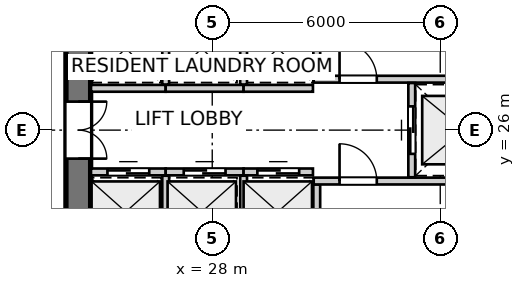
"""IFC4 building model, lengths in metres.
Left out: names, types, materials, properties, quantities, classifications, styles, units other than length and angle.
Written with IfcOpenShell. Run it as: python <this file> out.ifc"""

import sys

from ifc_helpers import new_model, si_unit, direction, frame, frame_2d, origin, place, context, subcontext, project, spatial, rectangle, extrude, source, transform, mapped, element, fill, save


model = new_model("IFC4")
c1 = context("Model", 3, precision=1e-05, world=origin(), true_north=direction((0.0, 1.0)))
c2 = subcontext(c1, "Body", "Model", "MODEL_VIEW")
j1 = project(units=[si_unit("LENGTHUNIT", "METRE"), si_unit("PLANEANGLEUNIT", "RADIAN")], contexts=[c1])
p1 = place(None, origin())
s1 = spatial("IfcSite", under=j1, at=p1, CompositionType="ELEMENT")
p2 = place(p1, origin())
s2 = spatial("IfcBuilding", under=s1, at=p2, CompositionType="ELEMENT")
p3 = place(p2, frame((0.0, 0.0, 118.4)))
s3 = spatial("IfcBuildingStorey", under=s2, at=p3, CompositionType="ELEMENT", Elevation=118.4)
p4 = place(p3, frame((24.475, 33.8, 0.0), z_axis=(0.0, 0.0, 1.0), x_axis=(0.0, -1.0, 0.0)))
e1 = element("IfcWall", 1, at=p4, inside=s3, PredefinedType="SHEAR", context=c2, shape_type="SweptSolid", body=[
    extrude(rectangle(XDim=15.6, YDim=0.65, at=frame_2d((7.8, 0.0))), origin(), (0.0, 0.0, 1.0), 2.95),
])
p5 = place(p4, frame((7.05, 0.0, 0.0)))
e2 = element("IfcOpeningElement", 2, at=p5, cuts=e1, PredefinedType="OPENING", context=c2, shape_type="SweptSolid", body=[
    extrude(rectangle(XDim=1.5, YDim=2.15, at=frame_2d((0.75, 1.075))), frame((0.0, 0.335, 0.0), z_axis=(0.0, -1.0, 0.0), x_axis=(1.0, 0.0, 0.0)), (0.0, 0.0, 1.0), 0.67),
])
p6 = place(p4, frame((3.52, 0.0, 0.0)))
e3 = element("IfcOpeningElement", 3, at=p6, cuts=e1, PredefinedType="OPENING", context=c2, shape_type="SweptSolid", body=[
    extrude(rectangle(XDim=0.86, YDim=2.05, at=frame_2d((0.43, 1.025))), frame((0.0, 0.335, 0.0), z_axis=(0.0, -1.0, 0.0), x_axis=(1.0, 0.0, 0.0)), (0.0, 0.0, 1.0), 0.67),
])
p7 = place(p4, frame((11.22, 0.0, 0.0)))
e4 = element("IfcOpeningElement", 4, at=p7, cuts=e1, PredefinedType="OPENING", context=c2, shape_type="SweptSolid", body=[
    extrude(rectangle(XDim=0.86, YDim=2.05, at=frame_2d((0.43, 1.025))), frame((0.0, 0.335, 0.0), z_axis=(0.0, -1.0, 0.0), x_axis=(1.0, 0.0, 0.0)), (0.0, 0.0, 1.0), 0.67),
])
p8 = place(p3, frame((30.75, 21.46, 0.0), z_axis=(0.0, 0.0, 1.0), x_axis=(0.0, 1.0, 0.0)))
e5 = element("IfcWall", 5, at=p8, inside=s3, PredefinedType="PARTITIONING", context=c2, shape_type="SweptSolid", body=[
    extrude(rectangle(XDim=3.11, YDim=0.18, at=frame_2d((1.555, 0.0))), origin(), (0.0, 0.0, 1.0), 2.95),
])
p9 = place(p8, frame((0.26, 0.0, 0.0)))
e6 = element("IfcOpeningElement", 6, at=p9, cuts=e5, PredefinedType="OPENING", context=c2, shape_type="SweptSolid", body=[
    extrude(rectangle(XDim=0.86, YDim=2.05, at=frame_2d((0.43, 1.025))), frame((0.0, 0.1, 0.0), z_axis=(0.0, -1.0, 0.0), x_axis=(1.0, 0.0, 0.0)), (0.0, 0.0, 1.0), 0.2),
])
p10 = place(p3, frame((30.67, 24.66, 0.0), z_axis=(0.0, 0.0, 1.0), x_axis=(1.0, 0.0, 0.0)))
e7 = element("IfcWall", 7, at=p10, inside=s3, PredefinedType="PARTITIONING", context=c2, shape_type="SweptSolid", body=[
    extrude(rectangle(XDim=5.22, YDim=0.18, at=frame_2d((2.61, 0.0))), origin(), (0.0, 0.0, 1.0), 2.95),
])
p11 = place(p10, frame((0.68, 0.0, 0.0)))
e8 = element("IfcOpeningElement", 8, at=p11, cuts=e7, PredefinedType="OPENING", context=c2, shape_type="SweptSolid", body=[
    extrude(rectangle(XDim=0.98, YDim=2.15, at=frame_2d((0.49, 1.075))), frame((0.0, 0.1, 0.0), z_axis=(0.0, -1.0, 0.0), x_axis=(1.0, 0.0, 0.0)), (0.0, 0.0, 1.0), 0.2),
])
p12 = place(p3, frame((30.75, 27.43, 0.0), z_axis=(0.0, 0.0, 1.0), x_axis=(0.0, 1.0, 0.0)))
e9 = element("IfcWall", 9, at=p12, inside=s3, PredefinedType="PARTITIONING", context=c2, shape_type="SweptSolid", body=[
    extrude(rectangle(XDim=3.11, YDim=0.18, at=frame_2d((1.555, 0.0))), origin(), (0.0, 0.0, 1.0), 2.95),
])
p13 = place(p12, frame((1.98, 0.0, 0.0)))
e10 = element("IfcOpeningElement", 10, at=p13, cuts=e9, PredefinedType="OPENING", context=c2, shape_type="SweptSolid", body=[
    extrude(rectangle(XDim=0.86, YDim=2.05, at=frame_2d((0.43, 1.025))), frame((0.0, 0.1, 0.0), z_axis=(0.0, -1.0, 0.0), x_axis=(1.0, 0.0, 0.0)), (0.0, 0.0, 1.0), 0.2),
])
p14 = place(p3, frame((30.67, 27.34, 0.0), z_axis=(0.0, 0.0, 1.0), x_axis=(1.0, 0.0, 0.0)))
e11 = element("IfcWall", 11, at=p14, inside=s3, PredefinedType="PARTITIONING", context=c2, shape_type="SweptSolid", body=[
    extrude(rectangle(XDim=5.22, YDim=0.18, at=frame_2d((2.61, 0.0))), origin(), (0.0, 0.0, 1.0), 2.95),
])
p15 = place(p14, frame((0.68, 0.0, 0.0)))
e12 = element("IfcOpeningElement", 12, at=p15, cuts=e11, PredefinedType="OPENING", context=c2, shape_type="SweptSolid", body=[
    extrude(rectangle(XDim=0.98, YDim=2.15, at=frame_2d((0.49, 1.075))), frame((0.0, 0.1, 0.0), z_axis=(0.0, -1.0, 0.0), x_axis=(1.0, 0.0, 0.0)), (0.0, 0.0, 1.0), 0.2),
])
p16 = place(p3, frame((33.25, 24.76, 0.0), z_axis=(0.0, 0.0, 1.0), x_axis=(0.0, 1.0, 0.0)))
e13 = element("IfcWall", 13, at=p16, inside=s3, PredefinedType="PARTITIONING", context=c2, shape_type="SweptSolid", body=[
    extrude(rectangle(XDim=2.48, YDim=0.18, at=frame_2d((1.24, 0.0))), origin(), (0.0, 0.0, 1.0), 2.95),
])
p17 = place(p16, frame((0.615, 0.0, 0.0)))
e14 = element("IfcOpeningElement", 14, at=p17, cuts=e13, PredefinedType="OPENING", context=c2, shape_type="SweptSolid", body=[
    extrude(rectangle(XDim=1.25, YDim=2.15, at=frame_2d((0.625, 1.075))), frame((0.0, 0.1, 0.0), z_axis=(0.0, -1.0, 0.0), x_axis=(1.0, 0.0, 0.0)), (0.0, 0.0, 1.0), 0.2),
])
p18 = place(p3, frame((24.81, 24.9, 0.0), z_axis=(0.0, 0.0, 1.0), x_axis=(1.0, 0.0, 0.0)))
e15 = element("IfcWall", 15, at=p18, inside=s3, PredefinedType="PARTITIONING", context=c2, shape_type="SweptSolid", body=[
    extrude(rectangle(XDim=1.965, YDim=0.18, at=frame_2d((0.982, 0.0))), origin(), (0.0, 0.0, 1.0), 2.95),
])
p19 = place(p18, frame((0.433, 0.0, 0.0)))
e16 = element("IfcOpeningElement", 16, at=p19, cuts=e15, PredefinedType="OPENING", context=c2, shape_type="SweptSolid", body=[
    extrude(rectangle(XDim=1.1, YDim=2.15, at=frame_2d((0.55, 1.075))), frame((0.0, 0.1, 0.0), z_axis=(0.0, -1.0, 0.0), x_axis=(1.0, 0.0, 0.0)), (0.0, 0.0, 1.0), 0.2),
])
p20 = place(p3, frame((26.775, 24.9, 0.0), z_axis=(0.0, 0.0, 1.0), x_axis=(1.0, 0.0, 0.0)))
e17 = element("IfcWall", 17, at=p20, inside=s3, PredefinedType="PARTITIONING", context=c2, shape_type="SweptSolid", body=[
    extrude(rectangle(XDim=2.05, YDim=0.18, at=frame_2d((1.025, 0.0))), origin(), (0.0, 0.0, 1.0), 2.95),
])
p21 = place(p20, frame((0.475, 0.0, 0.0)))
e18 = element("IfcOpeningElement", 18, at=p21, cuts=e17, PredefinedType="OPENING", context=c2, shape_type="SweptSolid", body=[
    extrude(rectangle(XDim=1.1, YDim=2.15, at=frame_2d((0.55, 1.075))), frame((0.0, 0.1, 0.0), z_axis=(0.0, -1.0, 0.0), x_axis=(1.0, 0.0, 0.0)), (0.0, 0.0, 1.0), 0.2),
])
p22 = place(p3, frame((26.775, 23.02, 0.0), z_axis=(0.0, 0.0, 1.0), x_axis=(0.0, 1.0, 0.0)))
e19 = element("IfcWall", 19, at=p22, inside=s3, PredefinedType="PARTITIONING", context=c2, shape_type="SweptSolid", body=[
    extrude(rectangle(XDim=1.78, YDim=0.18, at=frame_2d((0.89, 0.0))), origin(), (0.0, 0.0, 1.0), 2.95),
])
p23 = place(p3, frame((28.825, 24.9, 0.0), z_axis=(0.0, 0.0, 1.0), x_axis=(1.0, 0.0, 0.0)))
e20 = element("IfcWall", 20, at=p23, inside=s3, PredefinedType="PARTITIONING", context=c2, shape_type="SweptSolid", body=[
    extrude(rectangle(XDim=1.825, YDim=0.18, at=frame_2d((0.913, 0.0))), origin(), (0.0, 0.0, 1.0), 2.95),
])
p24 = place(p23, frame((0.363, 0.0, 0.0)))
e21 = element("IfcOpeningElement", 21, at=p24, cuts=e20, PredefinedType="OPENING", context=c2, shape_type="SweptSolid", body=[
    extrude(rectangle(XDim=1.1, YDim=2.15, at=frame_2d((0.55, 1.075))), frame((0.0, 0.1, 0.0), z_axis=(0.0, -1.0, 0.0), x_axis=(1.0, 0.0, 0.0)), (0.0, 0.0, 1.0), 0.2),
])
p25 = place(p3, frame((28.825, 23.02, 0.0), z_axis=(0.0, 0.0, 1.0), x_axis=(0.0, 1.0, 0.0)))
e22 = element("IfcWall", 22, at=p25, inside=s3, PredefinedType="PARTITIONING", context=c2, shape_type="SweptSolid", body=[
    extrude(rectangle(XDim=1.78, YDim=0.18, at=frame_2d((0.89, 0.0))), origin(), (0.0, 0.0, 1.0), 2.95),
])
p26 = place(p3, frame((24.81, 27.1, 0.0), z_axis=(0.0, 0.0, 1.0), x_axis=(1.0, 0.0, 0.0)))
e23 = element("IfcWall", 23, at=p26, inside=s3, PredefinedType="PARTITIONING", context=c2, shape_type="SweptSolid", body=[
    extrude(rectangle(XDim=1.965, YDim=0.18, at=frame_2d((0.982, 0.0))), origin(), (0.0, 0.0, 1.0), 2.95),
])
p27 = place(p3, frame((26.775, 27.1, 0.0), z_axis=(0.0, 0.0, 1.0), x_axis=(1.0, 0.0, 0.0)))
e24 = element("IfcWall", 24, at=p27, inside=s3, PredefinedType="PARTITIONING", context=c2, shape_type="SweptSolid", body=[
    extrude(rectangle(XDim=2.05, YDim=0.18, at=frame_2d((1.025, 0.0))), origin(), (0.0, 0.0, 1.0), 2.95),
])
p28 = place(p3, frame((26.775, 27.2, 0.0), z_axis=(0.0, 0.0, 1.0), x_axis=(0.0, 1.0, 0.0)))
e25 = element("IfcWall", 25, at=p28, inside=s3, PredefinedType="PARTITIONING", context=c2, shape_type="SweptSolid", body=[
    extrude(rectangle(XDim=1.78, YDim=0.18, at=frame_2d((0.89, 0.0))), origin(), (0.0, 0.0, 1.0), 2.95),
])
p29 = place(p3, frame((28.825, 27.1, 0.0), z_axis=(0.0, 0.0, 1.0), x_axis=(1.0, 0.0, 0.0)))
e26 = element("IfcWall", 26, at=p29, inside=s3, PredefinedType="PARTITIONING", context=c2, shape_type="SweptSolid", body=[
    extrude(rectangle(XDim=1.825, YDim=0.18, at=frame_2d((0.913, 0.0))), origin(), (0.0, 0.0, 1.0), 2.95),
])
p30 = place(p3, frame((28.825, 27.2, 0.0), z_axis=(0.0, 0.0, 1.0), x_axis=(0.0, 1.0, 0.0)))
e27 = element("IfcWall", 27, at=p30, inside=s3, PredefinedType="PARTITIONING", context=c2, shape_type="SweptSolid", body=[
    extrude(rectangle(XDim=1.78, YDim=0.18, at=frame_2d((0.89, 0.0))), origin(), (0.0, 0.0, 1.0), 2.95),
])
m1 = source(origin(), c2, "Body", "SweptSolid", [
    extrude(rectangle(XDim=1.5, YDim=2.15, at=frame_2d((0.75, 1.075))), frame((0.0, 0.025, 0.0), z_axis=(0.0, -1.0, 0.0), x_axis=(1.0, 0.0, 0.0)), (0.0, 0.0, 1.0), 0.05),
])
p31 = place(p5, origin())
e28 = element("IfcDoor", 28, at=p31, inside=s3, OperationType="DOUBLE_DOOR_SINGLE_SWING", PredefinedType="DOOR", context=c2, shape_type="MappedRepresentation", body=[
    mapped(m1, transform((0.0, 0.0, 0.0), x_axis=(1.0, 0.0, 0.0), y_axis=(0.0, 1.0, 0.0), z_axis=(0.0, 0.0, 1.0), scale=1.0)),
])
fill(e2, e28)
m2 = source(origin(), c2, "Body", "SweptSolid", [
    extrude(rectangle(XDim=0.98, YDim=2.15, at=frame_2d((0.49, 1.075))), frame((0.0, 0.025, 0.0), z_axis=(0.0, -1.0, 0.0), x_axis=(1.0, 0.0, 0.0)), (0.0, 0.0, 1.0), 0.05),
])
p32 = place(p11, origin())
e29 = element("IfcDoor", 29, at=p32, inside=s3, OperationType="SINGLE_SWING_LEFT", PredefinedType="DOOR", context=c2, shape_type="MappedRepresentation", body=[
    mapped(m2, transform((0.0, 0.0, 0.0), x_axis=(1.0, 0.0, 0.0), y_axis=(0.0, 1.0, 0.0), z_axis=(0.0, 0.0, 1.0), scale=1.0)),
])
fill(e8, e29)
p33 = place(p15, origin())
e30 = element("IfcDoor", 30, at=p33, inside=s3, OperationType="SINGLE_SWING_LEFT", PredefinedType="DOOR", context=c2, shape_type="MappedRepresentation", body=[
    mapped(m2, transform((0.0, 0.0, 0.0), x_axis=(1.0, 0.0, 0.0), y_axis=(0.0, 1.0, 0.0), z_axis=(0.0, 0.0, 1.0), scale=1.0)),
])
fill(e12, e30)
m3 = source(origin(), c2, "Body", "SweptSolid", [
    extrude(rectangle(XDim=1.25, YDim=2.15, at=frame_2d((0.625, 1.075))), frame((0.0, 0.025, 0.0), z_axis=(0.0, -1.0, 0.0), x_axis=(1.0, 0.0, 0.0)), (0.0, 0.0, 1.0), 0.05),
])
p34 = place(p17, origin())
e31 = element("IfcDoor", 31, at=p34, inside=s3, OperationType="DOUBLE_DOOR_SLIDING", PredefinedType="DOOR", context=c2, shape_type="MappedRepresentation", body=[
    mapped(m3, transform((0.0, 0.0, 0.0), x_axis=(1.0, 0.0, 0.0), y_axis=(0.0, 1.0, 0.0), z_axis=(0.0, 0.0, 1.0), scale=1.0)),
])
fill(e14, e31)
m4 = source(origin(), c2, "Body", "SweptSolid", [
    extrude(rectangle(XDim=1.1, YDim=2.15, at=frame_2d((0.55, 1.075))), frame((0.0, 0.025, 0.0), z_axis=(0.0, -1.0, 0.0), x_axis=(1.0, 0.0, 0.0)), (0.0, 0.0, 1.0), 0.05),
])
p35 = place(p19, origin())
e32 = element("IfcDoor", 32, at=p35, inside=s3, OperationType="DOUBLE_DOOR_SLIDING", PredefinedType="DOOR", context=c2, shape_type="MappedRepresentation", body=[
    mapped(m4, transform((0.0, 0.0, 0.0), x_axis=(1.0, 0.0, 0.0), y_axis=(0.0, 1.0, 0.0), z_axis=(0.0, 0.0, 1.0), scale=1.0)),
])
fill(e16, e32)
p36 = place(p21, origin())
e33 = element("IfcDoor", 33, at=p36, inside=s3, OperationType="DOUBLE_DOOR_SLIDING", PredefinedType="DOOR", context=c2, shape_type="MappedRepresentation", body=[
    mapped(m4, transform((0.0, 0.0, 0.0), x_axis=(1.0, 0.0, 0.0), y_axis=(0.0, 1.0, 0.0), z_axis=(0.0, 0.0, 1.0), scale=1.0)),
])
fill(e18, e33)
p37 = place(p24, origin())
e34 = element("IfcDoor", 34, at=p37, inside=s3, OperationType="DOUBLE_DOOR_SLIDING", PredefinedType="DOOR", context=c2, shape_type="MappedRepresentation", body=[
    mapped(m4, transform((0.0, 0.0, 0.0), x_axis=(1.0, 0.0, 0.0), y_axis=(0.0, 1.0, 0.0), z_axis=(0.0, 0.0, 1.0), scale=1.0)),
])
fill(e21, e34)
save(model, sys.argv[1])
